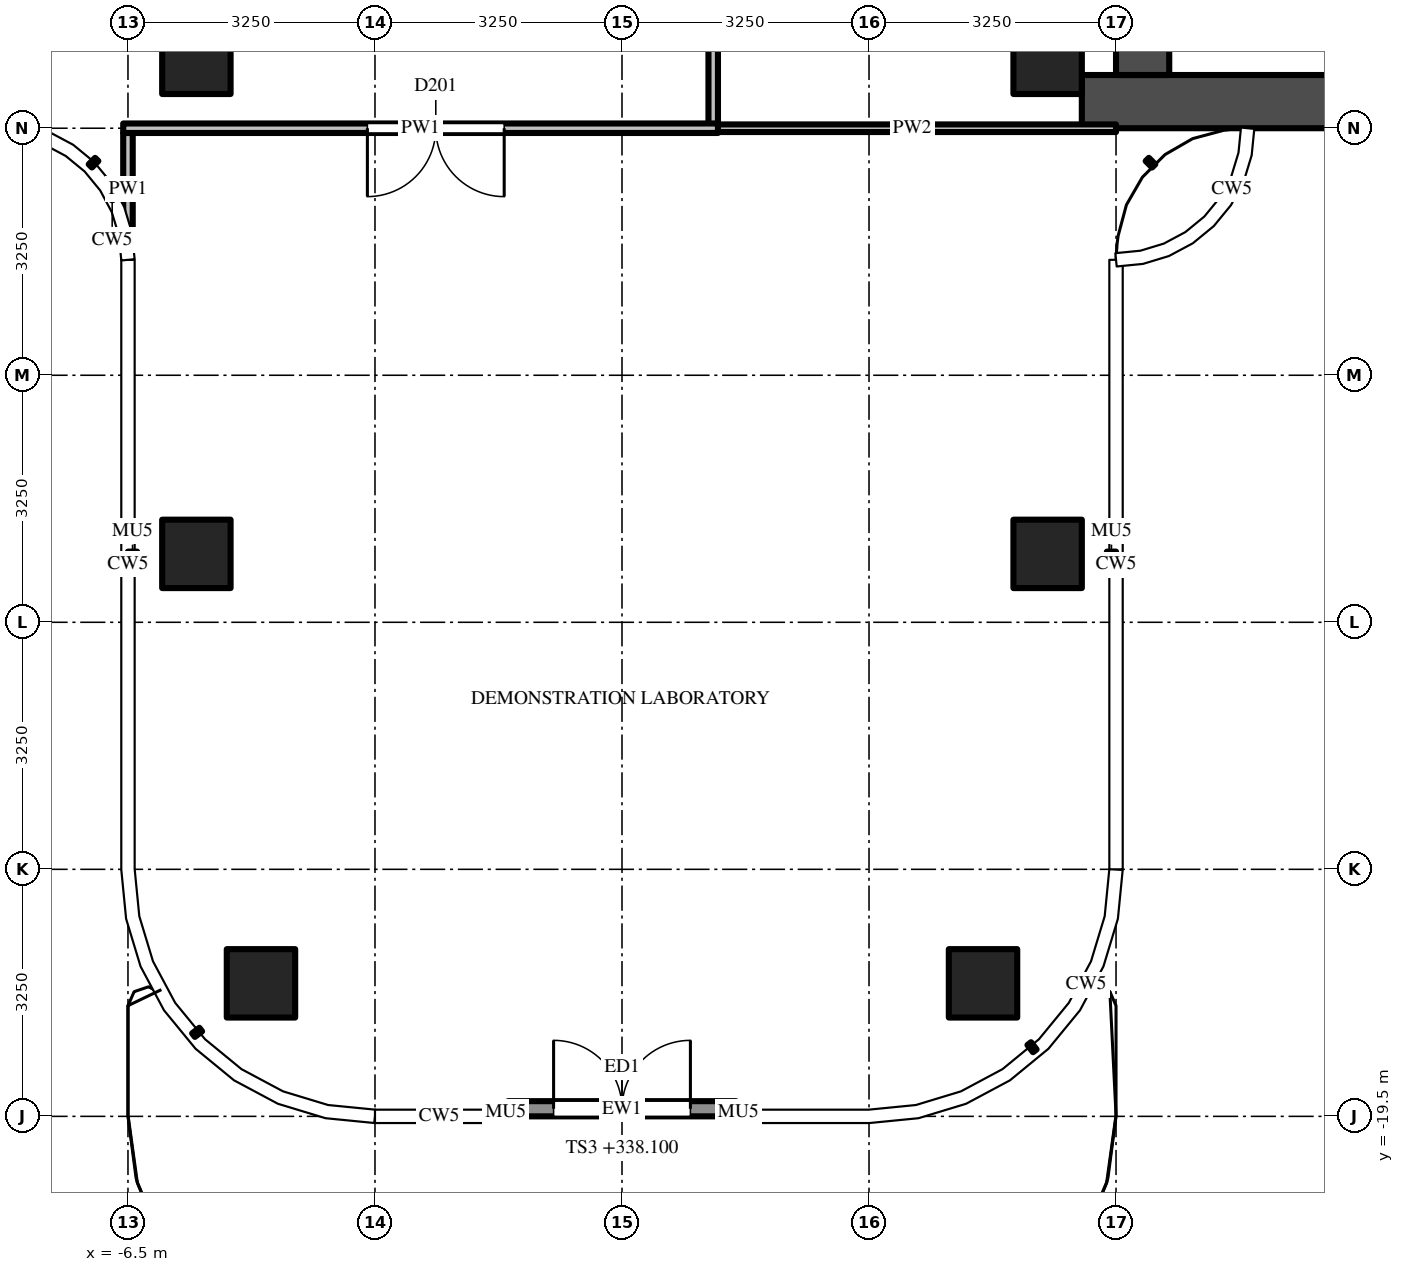
"""IFC4 building model, lengths in metres.
Left out: names, types, materials, properties, quantities, classifications, styles, units other than length and angle.
Written with IfcOpenShell. Run it as: python <this file> out.ifc"""

import sys

from ifc_helpers import new_model, si_unit, direction, frame, frame_2d, origin, origin_2d, place, context, subcontext, project, spatial, rectangle, extrude, source, transform, mapped, element, fill, save


model = new_model("IFC4")
c1 = context("Model", 3, precision=1e-05, world=origin(), true_north=direction((0.0, 1.0)))
c2 = subcontext(c1, "Body", "Model", "MODEL_VIEW")
j1 = project(units=[si_unit("LENGTHUNIT", "METRE"), si_unit("PLANEANGLEUNIT", "RADIAN")], contexts=[c1])
p1 = place(None, origin())
s1 = spatial("IfcSite", under=j1, at=p1, CompositionType="ELEMENT")
p2 = place(p1, origin())
s2 = spatial("IfcBuilding", under=s1, at=p2, CompositionType="ELEMENT")
p3 = place(p2, frame((0.0, 0.0, 338.1)))
s3 = spatial("IfcBuildingStorey", under=s2, at=p3, CompositionType="ELEMENT", Elevation=338.1)
m1 = source(origin(), c2, "Body", "SweptSolid", [
    extrude(rectangle(XDim=0.9, YDim=0.9, at=origin_2d()), origin(), (0.0, 0.0, 1.0), 4.0),
])
for number, where, z_axis, x_axis in (
    (1, (5.6, -5.6, 0.0), (0.0, 0.0, 1.0), (1.0, 0.0, 0.0)),
    (2, (-5.6, -5.6, 0.0), (0.0, 0.0, 1.0), (1.0, 0.0, 0.0)),
    (3, (5.6, -12.1, 0.0), (0.0, 0.0, 1.0), (1.0, 0.0, 0.0)),
    (4, (4.75, -17.75, 0.0), (0.0, 0.0, 1.0), (1.0, 0.0, 0.0)),
    (5, (-5.6, -12.1, 0.0), (0.0, 0.0, 1.0), (1.0, 0.0, 0.0)),
    (6, (-4.75, -17.75, 0.0), (0.0, 0.0, 1.0), (1.0, 0.0, 0.0)),
):
    element("IfcColumn", number, at=place(p3, frame(where, z_axis=z_axis, x_axis=x_axis)), inside=s3, PredefinedType="COLUMN", context=c2, shape_type="MappedRepresentation", body=[
        mapped(m1, transform((0.0, 0.0, 0.0))),
    ])
m2 = source(origin(), c2, "Body", "SweptSolid", [
    extrude(rectangle(XDim=16.7, YDim=0.7, at=frame_2d((8.35, 0.0))), origin(), (0.0, 0.0, 1.0), 3.75),
])
p4 = place(p3, frame((6.05, -6.15, 0.0), z_axis=(0.0, 0.0, 1.0), x_axis=(1.0, 0.0, 0.0)))
e7 = element("IfcWall", 7, at=p4, inside=s3, PredefinedType="SHEAR", context=c2, shape_type="MappedRepresentation", body=[
    mapped(m2, transform((0.0, 0.0, 0.0))),
])
m3 = source(origin(), c2, "Body", "SweptSolid", [
    extrude(rectangle(XDim=9.05, YDim=0.7, at=frame_2d((4.525, 0.0))), origin(), (0.0, 0.0, 1.0), 3.75),
])
p5 = place(p3, frame((6.85, -5.8, 0.0), z_axis=(0.0, 0.0, 1.0), x_axis=(0.0, 1.0, 0.0)))
e8 = element("IfcWall", 8, at=p5, inside=s3, PredefinedType="SHEAR", context=c2, shape_type="MappedRepresentation", body=[
    mapped(m3, transform((0.0, 0.0, 0.0))),
])
m4 = source(origin(), c2, "Body", "SweptSolid", [
    extrude(rectangle(XDim=1.8, YDim=2.1, at=frame_2d((0.9, 1.05))), frame((0.0, 0.36, 0.0), z_axis=(0.0, -1.0, 0.0), x_axis=(1.0, 0.0, 0.0)), (0.0, 0.0, 1.0), 0.72),
])
p6 = place(p5, frame((3.15, 0.0, 0.0)))
e9 = element("IfcOpeningElement", 9, at=p6, cuts=e8, PredefinedType="OPENING", context=c2, shape_type="MappedRepresentation", body=[
    mapped(m4, transform((0.0, 0.0, 0.0))),
])
m5 = source(origin(), c2, "Body", "SweptSolid", [
    extrude(rectangle(XDim=3.0, YDim=0.2, at=frame_2d((1.5, 0.0))), origin(), (0.0, 0.0, 1.0), 3.75),
])
p7 = place(p3, frame((-1.5, -19.4, 0.0), z_axis=(0.0, 0.0, 1.0), x_axis=(1.0, 0.0, 0.0)))
e10 = element("IfcWall", 10, at=p7, inside=s3, PredefinedType="SOLIDWALL", context=c2, shape_type="MappedRepresentation", body=[
    mapped(m5, transform((0.0, 0.0, 0.0))),
])
m6 = source(origin(), c2, "Body", "SweptSolid", [
    extrude(rectangle(XDim=1.8, YDim=2.4, at=frame_2d((0.9, 1.2))), frame((0.0, 0.11, 0.0), z_axis=(0.0, -1.0, 0.0), x_axis=(1.0, 0.0, 0.0)), (0.0, 0.0, 1.0), 0.22),
])
p8 = place(p7, frame((0.6, 0.0, 0.0)))
e11 = element("IfcOpeningElement", 11, at=p8, cuts=e10, PredefinedType="OPENING", context=c2, shape_type="MappedRepresentation", body=[
    mapped(m6, transform((0.0, 0.0, 0.0))),
])
m7 = source(origin(), c2, "Body", "SweptSolid", [
    extrude(rectangle(XDim=1.469, YDim=0.125, at=frame_2d((0.734, 0.0))), origin(), (0.0, 0.0, 1.0), 3.75),
])
p9 = place(p3, frame((-6.5, -6.562, 0.0), z_axis=(0.0, 0.0, 1.0), x_axis=(0.0, -1.0, 0.0)))
e12 = element("IfcWall", 12, at=p9, inside=s3, PredefinedType="PARTITIONING", context=c2, shape_type="MappedRepresentation", body=[
    mapped(m7, transform((0.0, 0.0, 0.0))),
])
m8 = source(origin(), c2, "Body", "SweptSolid", [
    extrude(rectangle(XDim=3.137, YDim=0.125, at=frame_2d((1.569, 0.0))), origin(), (0.0, 0.0, 1.0), 3.046),
])
p10 = place(p3, frame((1.2, -3.312, 0.0), z_axis=(0.0, 0.0, 1.0), x_axis=(0.0, -1.0, 0.0)))
e13 = element("IfcWall", 13, at=p10, inside=s3, PredefinedType="PARTITIONING", context=c2, shape_type="MappedRepresentation", body=[
    mapped(m8, transform((0.0, 0.0, 0.0))),
])
m9 = source(origin(), c2, "Body", "SweptSolid", [
    extrude(rectangle(XDim=5.363, YDim=0.1, at=frame_2d((2.681, 0.0))), origin(), (0.0, 0.0, 1.0), 2.83),
])
p11 = place(p3, frame((1.137, -6.5, 0.0), z_axis=(0.0, 0.0, 1.0), x_axis=(1.0, 0.0, 0.0)))
e14 = element("IfcWall", 14, at=p11, inside=s3, PredefinedType="PARTITIONING", context=c2, shape_type="MappedRepresentation", body=[
    mapped(m9, transform((0.0, 0.0, 0.0))),
])
m10 = source(origin(), c2, "Body", "SweptSolid", [
    extrude(rectangle(XDim=7.825, YDim=0.125, at=frame_2d((3.913, 0.0))), origin(), (0.0, 0.0, 1.0), 2.83),
])
p12 = place(p3, frame((1.262, -6.5, 0.0), z_axis=(0.0, 0.0, 1.0), x_axis=(-1.0, 0.0, 0.0)))
e15 = element("IfcWall", 15, at=p12, inside=s3, PredefinedType="PARTITIONING", context=c2, shape_type="MappedRepresentation", body=[
    mapped(m10, transform((0.0, 0.0, 0.0))),
])
m11 = source(origin(), c2, "Body", "SweptSolid", [
    extrude(rectangle(XDim=1.8, YDim=2.1, at=frame_2d((0.9, 1.05))), frame((0.0, 0.073, 0.0), z_axis=(0.0, -1.0, 0.0), x_axis=(1.0, 0.0, 0.0)), (0.0, 0.0, 1.0), 0.145),
])
p13 = place(p12, frame((2.812, 0.0, 0.0)))
e16 = element("IfcOpeningElement", 16, at=p13, cuts=e15, PredefinedType="OPENING", context=c2, shape_type="MappedRepresentation", body=[
    mapped(m11, transform((0.0, 0.0, 0.0))),
])
m12 = source(origin(), c2, "Body", "SweptSolid", [
    extrude(rectangle(XDim=1.8, YDim=2.4, at=frame_2d((0.9, 1.2))), frame((0.0, 0.025, 0.0), z_axis=(0.0, -1.0, 0.0), x_axis=(1.0, 0.0, 0.0)), (0.0, 0.0, 1.0), 0.05),
])
p14 = place(p8, origin())
e17 = element("IfcDoor", 17, at=p14, inside=s3, OperationType="DOUBLE_DOOR_SINGLE_SWING", PredefinedType="DOOR", context=c2, shape_type="MappedRepresentation", body=[
    mapped(m12, transform((0.0, 0.0, 0.0))),
])
fill(e11, e17)
m13 = source(origin(), c2, "Body", "SweptSolid", [
    extrude(rectangle(XDim=1.8, YDim=2.1, at=frame_2d((0.9, 1.05))), frame((0.0, 0.025, 0.0), z_axis=(0.0, -1.0, 0.0), x_axis=(1.0, 0.0, 0.0)), (0.0, 0.0, 1.0), 0.05),
])
p15 = place(p13, origin())
e18 = element("IfcDoor", 18, at=p15, inside=s3, OperationType="DOUBLE_DOOR_SINGLE_SWING", PredefinedType="DOOR", context=c2, shape_type="MappedRepresentation", body=[
    mapped(m13, transform((0.0, 0.0, 0.0))),
])
fill(e16, e18)
save(model, sys.argv[1])
